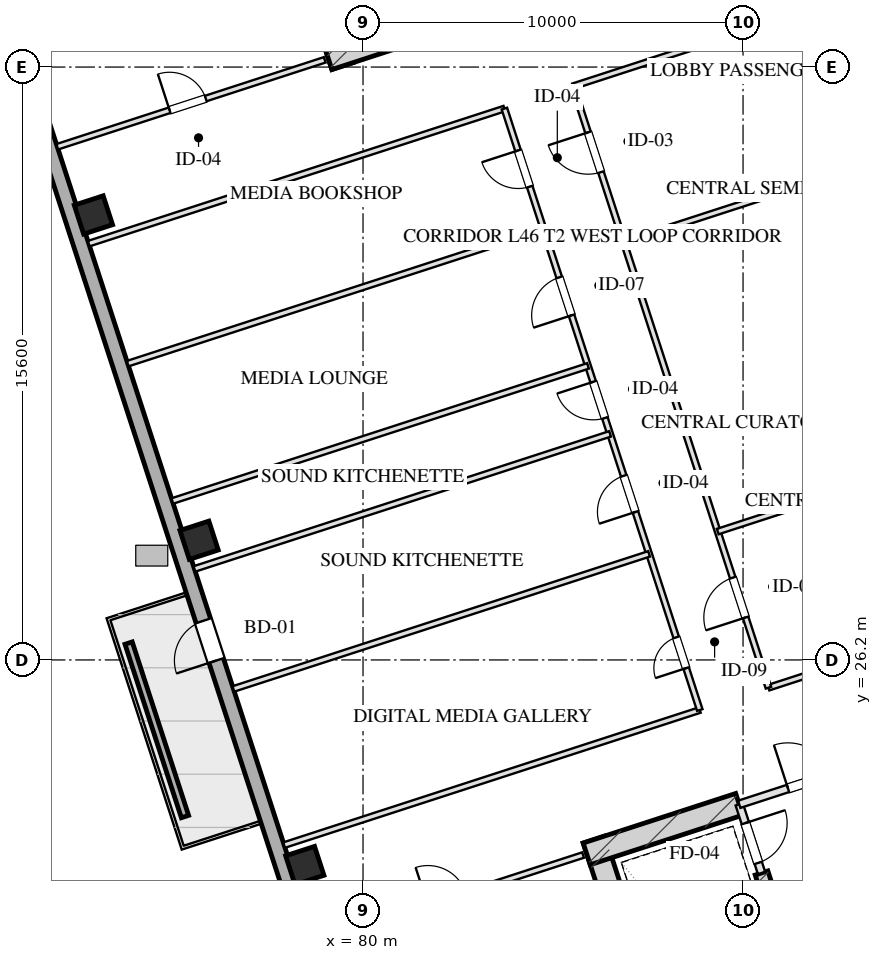
"""IFC4 building model, lengths in metres.
Left out: names, types, materials, properties, quantities, classifications, styles, units other than length and angle.
Written with IfcOpenShell. Run it as: python <this file> out.ifc"""

import sys

from ifc_helpers import new_model, si_unit, direction, frame, frame_2d, origin, origin_2d, place, context, subcontext, project, spatial, rectangle, hollow_rectangle, extrude, element, fill, save


model = new_model("IFC4")
c1 = context("Model", 3, precision=1e-05, world=origin(), true_north=direction((0.0, 1.0)))
c2 = subcontext(c1, "Body", "Model", "MODEL_VIEW")
j1 = project(units=[si_unit("LENGTHUNIT", "METRE"), si_unit("PLANEANGLEUNIT", "RADIAN")], contexts=[c1])
p1 = place(None, origin())
s1 = spatial("IfcSite", under=j1, at=p1, CompositionType="ELEMENT")
p2 = place(p1, origin())
s2 = spatial("IfcBuilding", under=s1, at=p2, CompositionType="ELEMENT")
p3 = place(p2, frame((0.0, 0.0, 173.65)))
s3 = spatial("IfcBuildingStorey", under=s2, at=p3, CompositionType="ELEMENT", Elevation=173.65)
p4 = place(p3, frame((86.078, 21.475, 0.0), z_axis=(0.0, 0.0, 1.0), x_axis=(0.309017938678, -0.951056209472, 0.0)))
e1 = element("IfcWall", 1, at=p4, inside=s3, PredefinedType="SHEAR", context=c2, shape_type="SweptSolid", body=[
    extrude(rectangle(XDim=9.48, YDim=0.6, at=frame_2d((4.74, 0.0))), origin(), (0.0, 0.0, 1.0), 3.45),
])
p5 = place(p3, frame((90.486, 20.594, 0.0), z_axis=(0.0, 0.0, 1.0), x_axis=(0.309020428229, -0.951055400562, 0.0)))
e2 = element("IfcWall", 2, at=p5, inside=s3, PredefinedType="SHEAR", context=c2, shape_type="SweptSolid", body=[
    extrude(rectangle(XDim=6.98, YDim=0.35, at=frame_2d((3.49, 0.0))), origin(), (0.0, 0.0, 1.0), 3.45),
])
p6 = place(p3, frame((85.886, 21.097, 0.0), z_axis=(0.0, 0.0, 1.0), x_axis=(0.951068073652, 0.308981422225, 0.0)))
e3 = element("IfcWall", 3, at=p6, inside=s3, PredefinedType="SHEAR", context=c2, shape_type="SweptSolid", body=[
    extrude(rectangle(XDim=4.22, YDim=0.6, at=frame_2d((2.11, 0.0))), origin(), (0.0, 0.0, 1.0), 3.45),
])
p7 = place(p3, frame((79.466, 41.828, 0.0), z_axis=(0.0, 0.0, 1.0), x_axis=(-0.309041232772, 0.951048640421, 0.0)))
e4 = element("IfcWall", 4, at=p7, inside=s3, PredefinedType="SHEAR", context=c2, shape_type="SweptSolid", body=[
    extrude(rectangle(XDim=9.48, YDim=0.6, at=frame_2d((4.74, 0.0))), origin(), (0.0, 0.0, 1.0), 3.45),
])
p8 = place(p3, frame((79.087, 42.021, 0.0), z_axis=(0.0, 0.0, 1.0), x_axis=(0.951062550203, 0.3089984233, 0.0)))
e5 = element("IfcWall", 5, at=p8, inside=s3, PredefinedType="SHEAR", context=c2, shape_type="SweptSolid", body=[
    extrude(rectangle(XDim=4.22, YDim=0.6, at=frame_2d((2.11, 0.0))), origin(), (0.0, 0.0, 1.0), 3.45),
])
for number, where, z_axis, x_axis in (
    (6, (78.468, 20.79, 0.0), (0.0, 0.0, 1.0), (0.951, 0.309, 0.0)),
    (7, (75.687, 29.349, 0.0), (0.0, 0.0, 1.0), (0.951, 0.309, 0.0)),
    (8, (72.906, 37.909, 0.0), (0.0, 0.0, 1.0), (0.951, 0.309, 0.0)),
):
    element("IfcColumn", number, at=place(p3, frame(where, z_axis=z_axis, x_axis=x_axis)), inside=s3, PredefinedType="COLUMN", context=c2, shape_type="SweptSolid", body=[
        extrude(hollow_rectangle(XDim=0.8, YDim=0.8, WallThickness=0.028, at=origin_2d()), origin(), (0.0, 0.0, 1.0), 3.451),
    ])
p9 = place(p3, frame((81.776, 8.827, 0.0), z_axis=(0.0, 0.0, 1.0), x_axis=(-0.309014228706, 0.951057414911, 0.0)))
e9 = element("IfcWall", 9, at=p9, inside=s3, PredefinedType="SOLIDWALL", context=c2, shape_type="SweptSolid", body=[
    extrude(rectangle(XDim=42.8, YDim=0.4, at=frame_2d((21.4, 0.0))), origin(), (0.0, 0.0, 1.0), 2.61),
])
p10 = place(p9, frame((18.25, 0.0, 0.0)))
e10 = element("IfcOpeningElement", 10, at=p10, cuts=e9, PredefinedType="OPENING", context=c2, shape_type="SweptSolid", body=[
    extrude(rectangle(XDim=1.1, YDim=2.15, at=frame_2d((0.55, 1.075))), frame((0.0, 0.21, 0.0), z_axis=(0.0, -1.0, 0.0), x_axis=(1.0, 0.0, 0.0)), (0.0, 0.0, 1.0), 0.42),
])
p11 = place(p3, frame((75.315, 22.079, 0.0), z_axis=(0.0, 0.0, 1.0), x_axis=(-0.309032019345, 0.951051634255, 0.0)))
e11 = element("IfcWall", 11, at=p11, inside=s3, PredefinedType="PARAPET", context=c2, shape_type="SweptSolid", body=[
    extrude(rectangle(XDim=4.8, YDim=0.2, at=frame_2d((2.4, 0.0))), origin(), (0.0, 0.0, 1.0), 0.75),
])
p12 = place(p3, frame((89.899, 22.401, 0.0), z_axis=(0.0, 0.0, 1.0), x_axis=(0.308932062672, -0.951084108086, 0.0)))
e12 = element("IfcWall", 12, at=p12, inside=s3, PredefinedType="PARTITIONING", context=c2, shape_type="SweptSolid", body=[
    extrude(rectangle(XDim=1.9, YDim=0.2, at=frame_2d((0.95, 0.0))), origin(), (0.0, 0.0, 1.0), 3.175),
])
p13 = place(p12, frame((0.52, 0.0, 0.0)))
e13 = element("IfcOpeningElement", 13, at=p13, cuts=e12, PredefinedType="OPENING", context=c2, shape_type="SweptSolid", body=[
    extrude(rectangle(XDim=1.1, YDim=2.05, at=frame_2d((0.55, 1.025))), frame((0.0, 0.11, 0.0), z_axis=(0.0, -1.0, 0.0), x_axis=(1.0, 0.0, 0.0)), (0.0, 0.0, 1.0), 0.22),
])
p14 = place(p3, frame((89.899, 22.401, 0.0), z_axis=(0.0, 0.0, 1.0), x_axis=(0.951046716504, 0.309047153403, 0.0)))
e14 = element("IfcWall", 14, at=p14, inside=s3, PredefinedType="PARTITIONING", context=c2, shape_type="SweptSolid", body=[
    extrude(rectangle(XDim=3.83, YDim=0.2, at=frame_2d((1.915, 0.0))), origin(), (0.0, 0.0, 1.0), 3.175),
])
p15 = place(p14, frame((1.35, 0.0, 0.0)))
e15 = element("IfcOpeningElement", 15, at=p15, cuts=e14, PredefinedType="OPENING", context=c2, shape_type="SweptSolid", body=[
    extrude(rectangle(XDim=1.2, YDim=2.05, at=frame_2d((0.6, 1.025))), frame((0.0, 0.11, 0.0), z_axis=(0.0, -1.0, 0.0), x_axis=(1.0, 0.0, 0.0)), (0.0, 0.0, 1.0), 0.22),
])
p16 = place(p3, frame((78.753, 18.78, 0.0), z_axis=(0.0, 0.0, 1.0), x_axis=(0.951060977215, 0.309003264738, 0.0)))
e16 = element("IfcWall", 16, at=p16, inside=s3, PredefinedType="PARTITIONING", context=c2, shape_type="SweptSolid", body=[
    extrude(rectangle(XDim=7.4, YDim=0.15, at=frame_2d((3.7, 0.0))), origin(), (0.0, 0.0, 1.0), 3.175),
])
p17 = place(p16, frame((3.108, 0.0, 0.0)))
e17 = element("IfcOpeningElement", 17, at=p17, cuts=e16, PredefinedType="OPENING", context=c2, shape_type="SweptSolid", body=[
    extrude(rectangle(XDim=1.05, YDim=2.05, at=frame_2d((0.525, 1.025))), frame((0.0, 0.085, 0.0), z_axis=(0.0, -1.0, 0.0), x_axis=(1.0, 0.0, 0.0)), (0.0, 0.0, 1.0), 0.17),
])
p18 = place(p3, frame((71.955, 39.703, 0.0), z_axis=(0.0, 0.0, 1.0), x_axis=(0.951060977215, 0.309003264738, 0.0)))
e18 = element("IfcWall", 18, at=p18, inside=s3, PredefinedType="PARTITIONING", context=c2, shape_type="SweptSolid", body=[
    extrude(rectangle(XDim=7.4, YDim=0.15, at=frame_2d((3.7, 0.0))), origin(), (0.0, 0.0, 1.0), 3.175),
])
p19 = place(p18, frame((3.108, 0.0, 0.0)))
e19 = element("IfcOpeningElement", 19, at=p19, cuts=e18, PredefinedType="OPENING", context=c2, shape_type="SweptSolid", body=[
    extrude(rectangle(XDim=1.0, YDim=2.05, at=frame_2d((0.5, 1.025))), frame((0.0, 0.085, 0.0), z_axis=(0.0, -1.0, 0.0), x_axis=(1.0, 0.0, 0.0)), (0.0, 0.0, 1.0), 0.17),
])
p20 = place(p3, frame((77.925, 21.328, 0.0), z_axis=(0.0, 0.0, 1.0), x_axis=(0.951054972381, 0.309021746015, 0.0)))
e20 = element("IfcWall", 20, at=p20, inside=s3, PredefinedType="PARTITIONING", context=c2, shape_type="SweptSolid", body=[
    extrude(rectangle(XDim=11.5, YDim=0.15, at=frame_2d((5.75, 0.0))), origin(), (0.0, 0.0, 1.0), 3.175),
])
p21 = place(p3, frame((90.669, 25.469, 0.0), z_axis=(0.0, 0.0, 1.0), x_axis=(0.95106136293, 0.309002077568, 0.0)))
e21 = element("IfcWall", 21, at=p21, inside=s3, PredefinedType="PARTITIONING", context=c2, shape_type="SweptSolid", body=[
    extrude(rectangle(XDim=8.15, YDim=0.15, at=frame_2d((4.075, 0.0))), origin(), (0.0, 0.0, 1.0), 3.175),
])
p22 = place(p3, frame((72.783, 37.154, 0.0), z_axis=(0.0, 0.0, 1.0), x_axis=(0.951056999652, 0.309015506751, 0.0)))
e22 = element("IfcWall", 22, at=p22, inside=s3, PredefinedType="PARTITIONING", context=c2, shape_type="SweptSolid", body=[
    extrude(rectangle(XDim=11.5, YDim=0.15, at=frame_2d((5.75, 0.0))), origin(), (0.0, 0.0, 1.0), 3.175),
])
p23 = place(p3, frame((85.527, 41.295, 0.0), z_axis=(0.0, 0.0, 1.0), x_axis=(0.951055419664, 0.309020369437, 0.0)))
e23 = element("IfcWall", 23, at=p23, inside=s3, PredefinedType="PARTITIONING", context=c2, shape_type="SweptSolid", body=[
    extrude(rectangle(XDim=8.15, YDim=0.15, at=frame_2d((4.075, 0.0))), origin(), (0.0, 0.0, 1.0), 3.175),
])
p24 = place(p3, frame((88.862, 24.882, 0.0), z_axis=(0.0, 0.0, 1.0), x_axis=(-0.309008771245, 0.951059188113, 0.0)))
e24 = element("IfcWall", 24, at=p24, inside=s3, PredefinedType="PARTITIONING", context=c2, shape_type="SweptSolid", body=[
    extrude(rectangle(XDim=16.64, YDim=0.15, at=frame_2d((8.32, 0.0))), origin(), (0.0, 0.0, 1.0), 3.175),
])
p25 = place(p24, frame((1.16, 0.0, 0.0)))
e25 = element("IfcOpeningElement", 25, at=p25, cuts=e24, PredefinedType="OPENING", context=c2, shape_type="SweptSolid", body=[
    extrude(rectangle(XDim=0.85, YDim=2.05, at=frame_2d((0.425, 1.025))), frame((0.0, 0.085, 0.0), z_axis=(0.0, -1.0, 0.0), x_axis=(1.0, 0.0, 0.0)), (0.0, 0.0, 1.0), 0.17),
])
p26 = place(p24, frame((5.48, 0.0, 0.0)))
e26 = element("IfcOpeningElement", 26, at=p26, cuts=e24, PredefinedType="OPENING", context=c2, shape_type="SweptSolid", body=[
    extrude(rectangle(XDim=1.0, YDim=2.05, at=frame_2d((0.5, 1.025))), frame((0.0, 0.085, 0.0), z_axis=(0.0, -1.0, 0.0), x_axis=(1.0, 0.0, 0.0)), (0.0, 0.0, 1.0), 0.17),
])
p27 = place(p24, frame((8.08, 0.0, 0.0)))
e27 = element("IfcOpeningElement", 27, at=p27, cuts=e24, PredefinedType="OPENING", context=c2, shape_type="SweptSolid", body=[
    extrude(rectangle(XDim=1.0, YDim=2.05, at=frame_2d((0.5, 1.025))), frame((0.0, 0.085, 0.0), z_axis=(0.0, -1.0, 0.0), x_axis=(1.0, 0.0, 0.0)), (0.0, 0.0, 1.0), 0.17),
])
p28 = place(p24, frame((10.92, 0.0, 0.0)))
e28 = element("IfcOpeningElement", 28, at=p28, cuts=e24, PredefinedType="OPENING", context=c2, shape_type="SweptSolid", body=[
    extrude(rectangle(XDim=1.05, YDim=2.05, at=frame_2d((0.525, 1.025))), frame((0.0, 0.085, 0.0), z_axis=(0.0, -1.0, 0.0), x_axis=(1.0, 0.0, 0.0)), (0.0, 0.0, 1.0), 0.17),
])
p29 = place(p24, frame((14.48, 0.0, 0.0)))
e29 = element("IfcOpeningElement", 29, at=p29, cuts=e24, PredefinedType="OPENING", context=c2, shape_type="SweptSolid", body=[
    extrude(rectangle(XDim=1.0, YDim=2.05, at=frame_2d((0.5, 1.025))), frame((0.0, 0.085, 0.0), z_axis=(0.0, -1.0, 0.0), x_axis=(1.0, 0.0, 0.0)), (0.0, 0.0, 1.0), 0.17),
])
p30 = place(p3, frame((90.669, 25.469, 0.0), z_axis=(0.0, 0.0, 1.0), x_axis=(-0.309022042254, 0.951054876125, 0.0)))
e30 = element("IfcWall", 30, at=p30, inside=s3, PredefinedType="PARTITIONING", context=c2, shape_type="SweptSolid", body=[
    extrude(rectangle(XDim=16.64, YDim=0.15, at=frame_2d((8.32, 0.0))), origin(), (0.0, 0.0, 1.0), 3.175),
])
p31 = place(p30, frame((1.944, 0.0, 0.0)))
e31 = element("IfcOpeningElement", 31, at=p31, cuts=e30, PredefinedType="OPENING", context=c2, shape_type="SweptSolid", body=[
    extrude(rectangle(XDim=1.1, YDim=2.05, at=frame_2d((0.55, 1.025))), frame((0.0, 0.085, 0.0), z_axis=(0.0, -1.0, 0.0), x_axis=(1.0, 0.0, 0.0)), (0.0, 0.0, 1.0), 0.17),
])
p32 = place(p30, frame((14.264, 0.0, 0.0)))
e32 = element("IfcOpeningElement", 32, at=p32, cuts=e30, PredefinedType="OPENING", context=c2, shape_type="SweptSolid", body=[
    extrude(rectangle(XDim=1.1, YDim=2.05, at=frame_2d((0.55, 1.025))), frame((0.0, 0.085, 0.0), z_axis=(0.0, -1.0, 0.0), x_axis=(1.0, 0.0, 0.0)), (0.0, 0.0, 1.0), 0.17),
])
p33 = place(p3, frame((89.334, 29.578, 0.0), z_axis=(0.0, 0.0, 1.0), x_axis=(0.951052558989, 0.309029173445, 0.0)))
e33 = element("IfcWall", 33, at=p33, inside=s3, PredefinedType="PARTITIONING", context=c2, shape_type="SweptSolid", body=[
    extrude(rectangle(XDim=8.15, YDim=0.15, at=frame_2d((4.075, 0.0))), origin(), (0.0, 0.0, 1.0), 3.175),
])
p34 = place(p3, frame((86.862, 37.186, 0.0), z_axis=(0.0, 0.0, 1.0), x_axis=(0.95106422313, 0.308993274169, 0.0)))
e34 = element("IfcWall", 34, at=p34, inside=s3, PredefinedType="PARTITIONING", context=c2, shape_type="SweptSolid", body=[
    extrude(rectangle(XDim=8.15, YDim=0.15, at=frame_2d((4.075, 0.0))), origin(), (0.0, 0.0, 1.0), 3.175),
])
for number, where, z_axis, x_axis in (
    (35, (76.59, 25.437, 0.0), (0.0, 0.0, 1.0), (0.951, 0.309, 0.0)),
    (36, (75.564, 28.594, 0.0), (0.0, 0.0, 1.0), (0.951, 0.309, 0.0)),
):
    element("IfcWall", number, at=place(p3, frame(where, z_axis=z_axis, x_axis=x_axis)), inside=s3, PredefinedType="PARTITIONING", context=c2, shape_type="SweptSolid", body=[
        extrude(rectangle(XDim=11.5, YDim=0.15, at=frame_2d((5.75, 0.0))), origin(), (0.0, 0.0, 1.0), 3.175),
    ])
for number, where, z_axis, x_axis in (
    (37, (74.983, 30.382, 0.0), (0.0, 0.0, 1.0), (0.951, 0.309, 0.0)),
    (38, (73.809, 33.996, 0.0), (0.0, 0.0, 1.0), (0.951, 0.309, 0.0)),
):
    element("IfcWall", number, at=place(p3, frame(where, z_axis=z_axis, x_axis=x_axis)), inside=s3, PredefinedType="PARTITIONING", context=c2, shape_type="SweptSolid", body=[
        extrude(rectangle(XDim=11.5, YDim=0.15, at=frame_2d((5.75, 0.0))), origin(), (0.0, 0.0, 1.0), 3.175),
    ])
p35 = place(p10, origin())
e39 = element("IfcDoor", 39, at=p35, inside=s3, OperationType="SINGLE_SWING_LEFT", PredefinedType="DOOR", context=c2, shape_type="SweptSolid", body=[
    extrude(rectangle(XDim=1.1, YDim=2.15, at=frame_2d((0.55, 1.075))), frame((0.0, 0.025, 0.0), z_axis=(0.0, -1.0, 0.0), x_axis=(1.0, 0.0, 0.0)), (0.0, 0.0, 1.0), 0.05),
])
fill(e10, e39)
p36 = place(p13, origin())
e40 = element("IfcDoor", 40, at=p36, inside=s3, OperationType="SINGLE_SWING_LEFT", PredefinedType="DOOR", context=c2, shape_type="SweptSolid", body=[
    extrude(rectangle(XDim=1.1, YDim=2.05, at=frame_2d((0.55, 1.025))), frame((0.0, 0.025, 0.0), z_axis=(0.0, -1.0, 0.0), x_axis=(1.0, 0.0, 0.0)), (0.0, 0.0, 1.0), 0.05),
])
fill(e13, e40)
p37 = place(p15, origin())
e41 = element("IfcDoor", 41, at=p37, inside=s3, OperationType="SINGLE_SWING_LEFT", PredefinedType="DOOR", context=c2, shape_type="SweptSolid", body=[
    extrude(rectangle(XDim=1.2, YDim=2.05, at=frame_2d((0.6, 1.025))), frame((0.0, 0.025, 0.0), z_axis=(0.0, -1.0, 0.0), x_axis=(1.0, 0.0, 0.0)), (0.0, 0.0, 1.0), 0.05),
])
fill(e15, e41)
p38 = place(p19, origin())
e42 = element("IfcDoor", 42, at=p38, inside=s3, OperationType="SINGLE_SWING_LEFT", PredefinedType="DOOR", context=c2, shape_type="SweptSolid", body=[
    extrude(rectangle(XDim=1.0, YDim=2.05, at=frame_2d((0.5, 1.025))), frame((0.0, 0.025, 0.0), z_axis=(0.0, -1.0, 0.0), x_axis=(1.0, 0.0, 0.0)), (0.0, 0.0, 1.0), 0.05),
])
fill(e19, e42)
p39 = place(p25, origin())
e43 = element("IfcDoor", 43, at=p39, inside=s3, OperationType="SINGLE_SWING_LEFT", PredefinedType="DOOR", context=c2, shape_type="SweptSolid", body=[
    extrude(rectangle(XDim=0.85, YDim=2.05, at=frame_2d((0.425, 1.025))), frame((0.0, 0.025, 0.0), z_axis=(0.0, -1.0, 0.0), x_axis=(1.0, 0.0, 0.0)), (0.0, 0.0, 1.0), 0.05),
])
fill(e25, e43)
p40 = place(p26, origin())
e44 = element("IfcDoor", 44, at=p40, inside=s3, OperationType="SINGLE_SWING_LEFT", PredefinedType="DOOR", context=c2, shape_type="SweptSolid", body=[
    extrude(rectangle(XDim=1.0, YDim=2.05, at=frame_2d((0.5, 1.025))), frame((0.0, 0.025, 0.0), z_axis=(0.0, -1.0, 0.0), x_axis=(1.0, 0.0, 0.0)), (0.0, 0.0, 1.0), 0.05),
])
fill(e26, e44)
p41 = place(p27, origin())
e45 = element("IfcDoor", 45, at=p41, inside=s3, OperationType="SINGLE_SWING_RIGHT", PredefinedType="DOOR", context=c2, shape_type="SweptSolid", body=[
    extrude(rectangle(XDim=1.0, YDim=2.05, at=frame_2d((0.5, 1.025))), frame((0.0, 0.025, 0.0), z_axis=(0.0, -1.0, 0.0), x_axis=(1.0, 0.0, 0.0)), (0.0, 0.0, 1.0), 0.05),
])
fill(e27, e45)
p42 = place(p28, origin())
e46 = element("IfcDoor", 46, at=p42, inside=s3, OperationType="SINGLE_SWING_LEFT", PredefinedType="DOOR", context=c2, shape_type="SweptSolid", body=[
    extrude(rectangle(XDim=1.05, YDim=2.05, at=frame_2d((0.525, 1.025))), frame((0.0, 0.025, 0.0), z_axis=(0.0, -1.0, 0.0), x_axis=(1.0, 0.0, 0.0)), (0.0, 0.0, 1.0), 0.05),
])
fill(e28, e46)
p43 = place(p29, origin())
e47 = element("IfcDoor", 47, at=p43, inside=s3, OperationType="SINGLE_SWING_RIGHT", PredefinedType="DOOR", context=c2, shape_type="SweptSolid", body=[
    extrude(rectangle(XDim=1.0, YDim=2.05, at=frame_2d((0.5, 1.025))), frame((0.0, 0.025, 0.0), z_axis=(0.0, -1.0, 0.0), x_axis=(1.0, 0.0, 0.0)), (0.0, 0.0, 1.0), 0.05),
])
fill(e29, e47)
p44 = place(p31, origin())
e48 = element("IfcDoor", 48, at=p44, inside=s3, OperationType="SINGLE_SWING_LEFT", PredefinedType="DOOR", context=c2, shape_type="SweptSolid", body=[
    extrude(rectangle(XDim=1.1, YDim=2.05, at=frame_2d((0.55, 1.025))), frame((0.0, 0.025, 0.0), z_axis=(0.0, -1.0, 0.0), x_axis=(1.0, 0.0, 0.0)), (0.0, 0.0, 1.0), 0.05),
])
fill(e31, e48)
p45 = place(p32, origin())
e49 = element("IfcDoor", 49, at=p45, inside=s3, OperationType="SINGLE_SWING_RIGHT", PredefinedType="DOOR", context=c2, shape_type="SweptSolid", body=[
    extrude(rectangle(XDim=1.1, YDim=2.05, at=frame_2d((0.55, 1.025))), frame((0.0, 0.025, 0.0), z_axis=(0.0, -1.0, 0.0), x_axis=(1.0, 0.0, 0.0)), (0.0, 0.0, 1.0), 0.05),
])
fill(e32, e49)
save(model, sys.argv[1])
